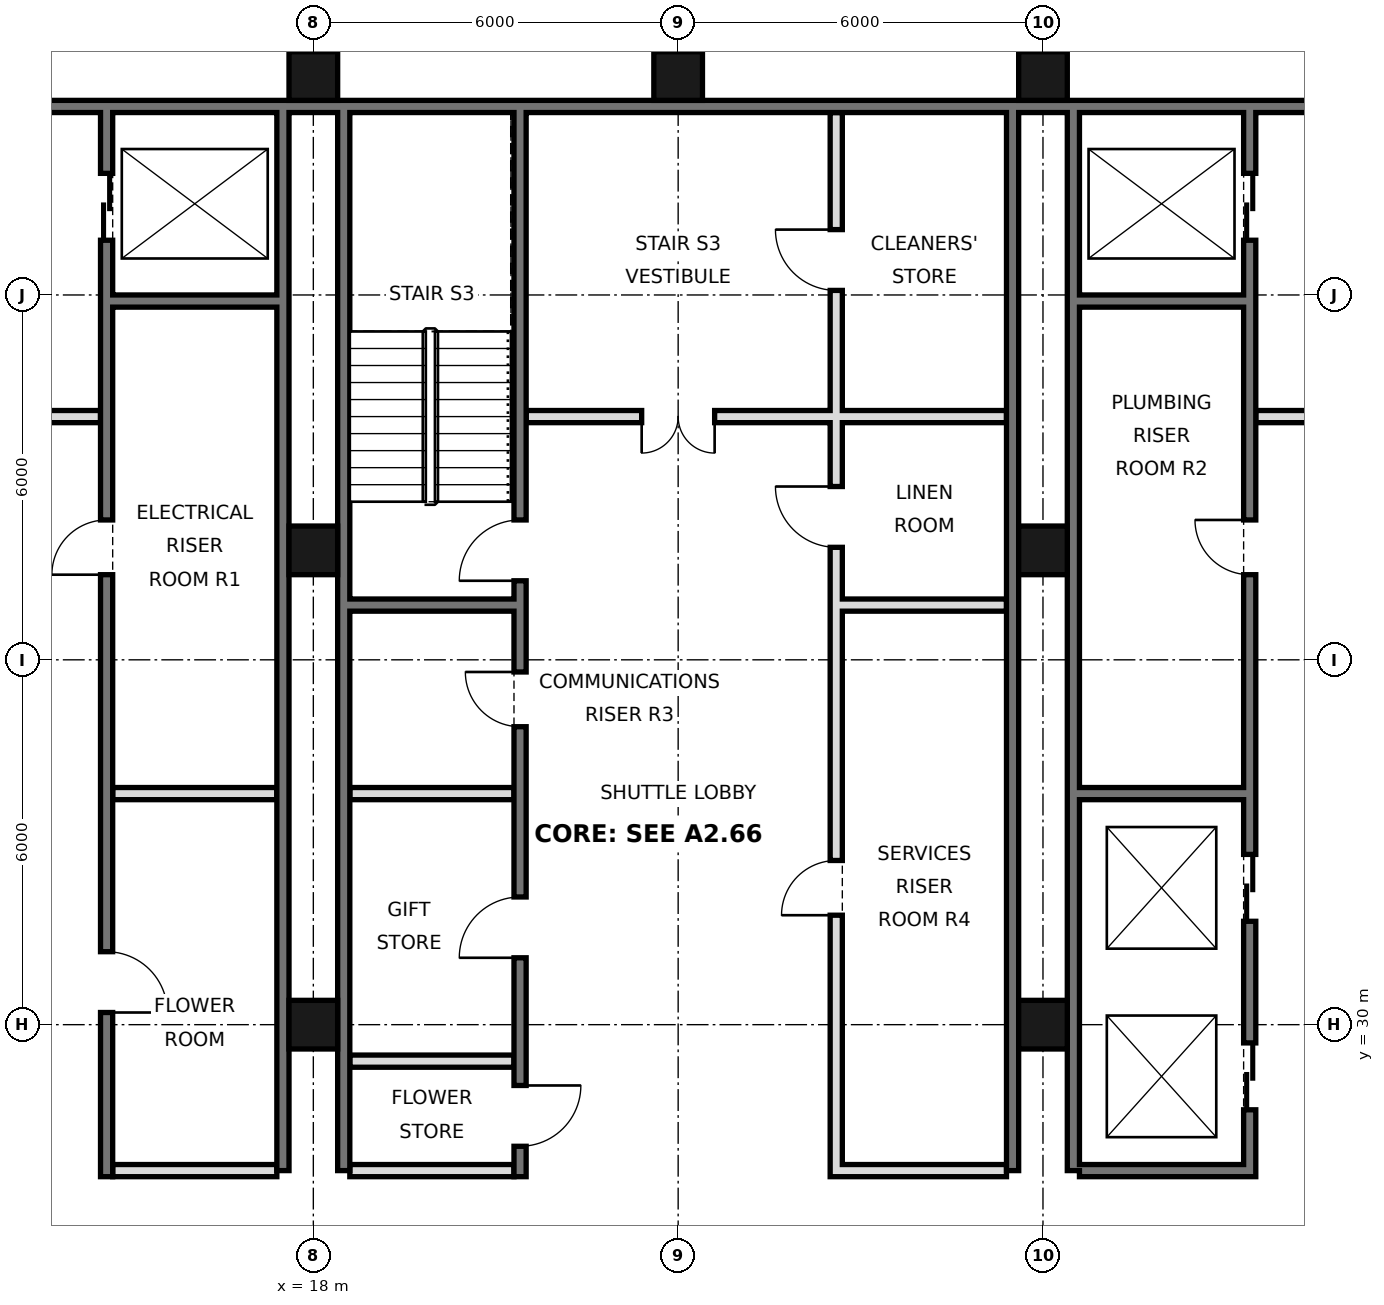
"""IFC4 building model, lengths in metres.
Left out: names, types, materials, properties, quantities, classifications, styles, units other than length and angle.
Written with IfcOpenShell. Run it as: python <this file> out.ifc"""

import sys

from ifc_helpers import new_model, si_unit, direction, frame, frame_2d, origin, origin_2d, place, context, subcontext, project, spatial, rectangle, hollow_rectangle, extrude, element, fill, save


model = new_model("IFC4")
c1 = context("Model", 3, precision=1e-05, world=origin(), true_north=direction((0.0, 1.0)))
c2 = subcontext(c1, "Body", "Model", "MODEL_VIEW")
j1 = project(units=[si_unit("LENGTHUNIT", "METRE"), si_unit("PLANEANGLEUNIT", "RADIAN")], contexts=[c1])
p1 = place(None, origin())
s1 = spatial("IfcSite", under=j1, at=p1, CompositionType="ELEMENT")
p2 = place(p1, origin())
s2 = spatial("IfcBuilding", under=s1, at=p2, CompositionType="ELEMENT")
p3 = place(p2, frame((0.0, 0.0, 263.0)))
s3 = spatial("IfcBuildingStorey", under=s2, at=p3, CompositionType="ELEMENT", Elevation=263.0)
for number, where, z_axis, x_axis in (
    (1, (18.0, 30.0, 0.0), (0.0, 0.0, 1.0), (1.0, 0.0, 0.0)),
    (2, (18.0, 37.8, 0.0), (0.0, 0.0, 1.0), (1.0, 0.0, 0.0)),
    (3, (18.0, 45.6, 0.0), (0.0, 0.0, 1.0), (1.0, 0.0, 0.0)),
    (4, (24.0, 45.6, 0.0), (0.0, 0.0, 1.0), (1.0, 0.0, 0.0)),
    (5, (30.0, 30.0, 0.0), (0.0, 0.0, 1.0), (1.0, 0.0, 0.0)),
    (6, (30.0, 37.8, 0.0), (0.0, 0.0, 1.0), (1.0, 0.0, 0.0)),
    (7, (30.0, 45.6, 0.0), (0.0, 0.0, 1.0), (1.0, 0.0, 0.0)),
):
    element("IfcColumn", number, at=place(p3, frame(where, z_axis=z_axis, x_axis=x_axis)), inside=s3, PredefinedType="COLUMN", context=c2, shape_type="SweptSolid", body=[
        extrude(hollow_rectangle(XDim=0.8, YDim=0.8, WallThickness=0.032, at=origin_2d()), origin(), (0.0, 0.0, 1.0), 3.6),
    ])
p4 = place(p3, frame((6.6, 45.1, 0.0), z_axis=(0.0, 0.0, 1.0), x_axis=(1.0, 0.0, 0.0)))
e8 = element("IfcWall", 8, at=p4, inside=s3, PredefinedType="SOLIDWALL", context=c2, shape_type="SweptSolid", body=[
    extrude(rectangle(XDim=34.8, YDim=0.2, at=frame_2d((17.4, 0.0))), origin(), (0.0, 0.0, 1.0), 3.42),
])
for number, where, z_axis, x_axis in (
    (9, (17.5, 27.6, 0.0), (0.0, 0.0, 1.0), (0.0, 1.0, 0.0)),
    (10, (18.5, 27.6, 0.0), (0.0, 0.0, 1.0), (0.0, 1.0, 0.0)),
    (11, (29.5, 27.6, 0.0), (0.0, 0.0, 1.0), (0.0, 1.0, 0.0)),
    (12, (30.5, 27.6, 0.0), (0.0, 0.0, 1.0), (0.0, 1.0, 0.0)),
):
    element("IfcWall", number, at=place(p3, frame(where, z_axis=z_axis, x_axis=x_axis)), inside=s3, PredefinedType="SOLIDWALL", context=c2, shape_type="SweptSolid", body=[
        extrude(rectangle(XDim=17.5, YDim=0.2, at=frame_2d((8.75, 0.0))), origin(), (0.0, 0.0, 1.0), 3.42),
    ])
p5 = place(p3, frame((14.6, 27.5, 0.0), z_axis=(0.0, 0.0, 1.0), x_axis=(0.0, 1.0, 0.0)))
e13 = element("IfcWall", 13, at=p5, inside=s3, PredefinedType="SOLIDWALL", context=c2, shape_type="SweptSolid", body=[
    extrude(rectangle(XDim=17.5, YDim=0.2, at=frame_2d((8.75, 0.0))), origin(), (0.0, 0.0, 1.0), 3.42),
])
p6 = place(p5, frame((15.4, 0.0, 0.0)))
e14 = element("IfcOpeningElement", 14, at=p6, cuts=e13, PredefinedType="OPENING", context=c2, shape_type="SweptSolid", body=[
    extrude(rectangle(XDim=1.1, YDim=2.1, at=frame_2d((0.55, 1.05))), frame((0.0, 0.11, 0.0), z_axis=(0.0, -1.0, 0.0), x_axis=(1.0, 0.0, 0.0)), (0.0, 0.0, 1.0), 0.22),
])
p7 = place(p5, frame((2.7, 0.0, 0.0)))
e15 = element("IfcOpeningElement", 15, at=p7, cuts=e13, PredefinedType="OPENING", context=c2, shape_type="SweptSolid", body=[
    extrude(rectangle(XDim=1.0, YDim=2.1, at=frame_2d((0.5, 1.05))), frame((0.0, 0.11, 0.0), z_axis=(0.0, -1.0, 0.0), x_axis=(1.0, 0.0, 0.0)), (0.0, 0.0, 1.0), 0.22),
])
p8 = place(p5, frame((9.9, 0.0, 0.0)))
e16 = element("IfcOpeningElement", 16, at=p8, cuts=e13, PredefinedType="OPENING", context=c2, shape_type="SweptSolid", body=[
    extrude(rectangle(XDim=0.9, YDim=2.1, at=frame_2d((0.45, 1.05))), frame((0.0, 0.11, 0.0), z_axis=(0.0, -1.0, 0.0), x_axis=(1.0, 0.0, 0.0)), (0.0, 0.0, 1.0), 0.22),
])
p9 = place(p3, frame((21.4, 27.5, 0.0), z_axis=(0.0, 0.0, 1.0), x_axis=(0.0, 1.0, 0.0)))
e17 = element("IfcWall", 17, at=p9, inside=s3, PredefinedType="SOLIDWALL", context=c2, shape_type="SweptSolid", body=[
    extrude(rectangle(XDim=17.5, YDim=0.2, at=frame_2d((8.75, 0.0))), origin(), (0.0, 0.0, 1.0), 3.42),
])
p10 = place(p9, frame((0.5, 0.0, 0.0)))
e18 = element("IfcOpeningElement", 18, at=p10, cuts=e17, PredefinedType="OPENING", context=c2, shape_type="SweptSolid", body=[
    extrude(rectangle(XDim=1.0, YDim=2.1, at=frame_2d((0.5, 1.05))), frame((0.0, 0.11, 0.0), z_axis=(0.0, -1.0, 0.0), x_axis=(1.0, 0.0, 0.0)), (0.0, 0.0, 1.0), 0.22),
])
p11 = place(p9, frame((3.6, 0.0, 0.0)))
e19 = element("IfcOpeningElement", 19, at=p11, cuts=e17, PredefinedType="OPENING", context=c2, shape_type="SweptSolid", body=[
    extrude(rectangle(XDim=1.0, YDim=2.1, at=frame_2d((0.5, 1.05))), frame((0.0, 0.11, 0.0), z_axis=(0.0, -1.0, 0.0), x_axis=(1.0, 0.0, 0.0)), (0.0, 0.0, 1.0), 0.22),
])
p12 = place(p9, frame((9.8, 0.0, 0.0)))
e20 = element("IfcOpeningElement", 20, at=p12, cuts=e17, PredefinedType="OPENING", context=c2, shape_type="SweptSolid", body=[
    extrude(rectangle(XDim=1.0, YDim=2.1, at=frame_2d((0.5, 1.05))), frame((0.0, 0.11, 0.0), z_axis=(0.0, -1.0, 0.0), x_axis=(1.0, 0.0, 0.0)), (0.0, 0.0, 1.0), 0.22),
])
p13 = place(p9, frame((7.4, 0.0, 0.0)))
e21 = element("IfcOpeningElement", 21, at=p13, cuts=e17, PredefinedType="OPENING", context=c2, shape_type="SweptSolid", body=[
    extrude(rectangle(XDim=0.9, YDim=2.1, at=frame_2d((0.45, 1.05))), frame((0.0, 0.11, 0.0), z_axis=(0.0, -1.0, 0.0), x_axis=(1.0, 0.0, 0.0)), (0.0, 0.0, 1.0), 0.22),
])
p14 = place(p3, frame((26.6, 27.5, 0.0), z_axis=(0.0, 0.0, 1.0), x_axis=(0.0, 1.0, 0.0)))
e22 = element("IfcWall", 22, at=p14, inside=s3, PredefinedType="SOLIDWALL", context=c2, shape_type="SweptSolid", body=[
    extrude(rectangle(XDim=17.5, YDim=0.2, at=frame_2d((8.75, 0.0))), origin(), (0.0, 0.0, 1.0), 3.42),
])
p15 = place(p14, frame((4.3, 0.0, 0.0)))
e23 = element("IfcOpeningElement", 23, at=p15, cuts=e22, PredefinedType="OPENING", context=c2, shape_type="SweptSolid", body=[
    extrude(rectangle(XDim=0.9, YDim=2.1, at=frame_2d((0.45, 1.05))), frame((0.0, 0.11, 0.0), z_axis=(0.0, -1.0, 0.0), x_axis=(1.0, 0.0, 0.0)), (0.0, 0.0, 1.0), 0.22),
])
p16 = place(p14, frame((10.35, 0.0, 0.0)))
e24 = element("IfcOpeningElement", 24, at=p16, cuts=e22, PredefinedType="OPENING", context=c2, shape_type="SweptSolid", body=[
    extrude(rectangle(XDim=1.0, YDim=2.1, at=frame_2d((0.5, 1.05))), frame((0.0, 0.11, 0.0), z_axis=(0.0, -1.0, 0.0), x_axis=(1.0, 0.0, 0.0)), (0.0, 0.0, 1.0), 0.22),
])
p17 = place(p14, frame((14.575, 0.0, 0.0)))
e25 = element("IfcOpeningElement", 25, at=p17, cuts=e22, PredefinedType="OPENING", context=c2, shape_type="SweptSolid", body=[
    extrude(rectangle(XDim=1.0, YDim=2.1, at=frame_2d((0.5, 1.05))), frame((0.0, 0.11, 0.0), z_axis=(0.0, -1.0, 0.0), x_axis=(1.0, 0.0, 0.0)), (0.0, 0.0, 1.0), 0.22),
])
p18 = place(p3, frame((33.4, 27.5, 0.0), z_axis=(0.0, 0.0, 1.0), x_axis=(0.0, 1.0, 0.0)))
e26 = element("IfcWall", 26, at=p18, inside=s3, PredefinedType="SOLIDWALL", context=c2, shape_type="SweptSolid", body=[
    extrude(rectangle(XDim=17.5, YDim=0.2, at=frame_2d((8.75, 0.0))), origin(), (0.0, 0.0, 1.0), 3.42),
])
p19 = place(p18, frame((1.1, 0.0, 0.0)))
e27 = element("IfcOpeningElement", 27, at=p19, cuts=e26, PredefinedType="OPENING", context=c2, shape_type="SweptSolid", body=[
    extrude(rectangle(XDim=1.1, YDim=2.1, at=frame_2d((0.55, 1.05))), frame((0.0, 0.11, 0.0), z_axis=(0.0, -1.0, 0.0), x_axis=(1.0, 0.0, 0.0)), (0.0, 0.0, 1.0), 0.22),
])
p20 = place(p18, frame((4.2, 0.0, 0.0)))
e28 = element("IfcOpeningElement", 28, at=p20, cuts=e26, PredefinedType="OPENING", context=c2, shape_type="SweptSolid", body=[
    extrude(rectangle(XDim=1.1, YDim=2.1, at=frame_2d((0.55, 1.05))), frame((0.0, 0.11, 0.0), z_axis=(0.0, -1.0, 0.0), x_axis=(1.0, 0.0, 0.0)), (0.0, 0.0, 1.0), 0.22),
])
p21 = place(p18, frame((15.4, 0.0, 0.0)))
e29 = element("IfcOpeningElement", 29, at=p21, cuts=e26, PredefinedType="OPENING", context=c2, shape_type="SweptSolid", body=[
    extrude(rectangle(XDim=1.1, YDim=2.1, at=frame_2d((0.55, 1.05))), frame((0.0, 0.11, 0.0), z_axis=(0.0, -1.0, 0.0), x_axis=(1.0, 0.0, 0.0)), (0.0, 0.0, 1.0), 0.22),
])
p22 = place(p18, frame((9.9, 0.0, 0.0)))
e30 = element("IfcOpeningElement", 30, at=p22, cuts=e26, PredefinedType="OPENING", context=c2, shape_type="SweptSolid", body=[
    extrude(rectangle(XDim=0.9, YDim=2.1, at=frame_2d((0.45, 1.05))), frame((0.0, 0.11, 0.0), z_axis=(0.0, -1.0, 0.0), x_axis=(1.0, 0.0, 0.0)), (0.0, 0.0, 1.0), 0.22),
])
for number, where, z_axis, x_axis in (
    (31, (14.7, 27.6, 0.0), (0.0, 0.0, 1.0), (1.0, 0.0, 0.0)),
    (32, (18.6, 27.6, 0.0), (0.0, 0.0, 1.0), (1.0, 0.0, 0.0)),
):
    element("IfcWall", number, at=place(p3, frame(where, z_axis=z_axis, x_axis=x_axis)), inside=s3, PredefinedType="PARTITIONING", context=c2, shape_type="SweptSolid", body=[
        extrude(rectangle(XDim=2.7, YDim=0.2, at=frame_2d((1.35, 0.0))), origin(), (0.0, 0.0, 1.0), 3.42),
    ])
for number, where, z_axis, x_axis in (
    (33, (26.7, 27.6, 0.0), (0.0, 0.0, 1.0), (1.0, 0.0, 0.0)),
    (34, (30.6, 27.6, 0.0), (0.0, 0.0, 1.0), (1.0, 0.0, 0.0)),
):
    element("IfcWall", number, at=place(p3, frame(where, z_axis=z_axis, x_axis=x_axis)), inside=s3, PredefinedType="SOLIDWALL", context=c2, shape_type="SweptSolid", body=[
        extrude(rectangle(XDim=2.7, YDim=0.2, at=frame_2d((1.35, 0.0))), origin(), (0.0, 0.0, 1.0), 3.42),
    ])
p23 = place(p3, frame((18.6, 29.4, 0.0), z_axis=(0.0, 0.0, 1.0), x_axis=(1.0, 0.0, 0.0)))
e35 = element("IfcWall", 35, at=p23, inside=s3, PredefinedType="PARTITIONING", context=c2, shape_type="SweptSolid", body=[
    extrude(rectangle(XDim=2.7, YDim=0.2, at=frame_2d((1.35, 0.0))), origin(), (0.0, 0.0, 1.0), 3.42),
])
for number, where, z_axis, x_axis in (
    (36, (14.7, 33.8, 0.0), (0.0, 0.0, 1.0), (1.0, 0.0, 0.0)),
    (37, (18.6, 33.8, 0.0), (0.0, 0.0, 1.0), (1.0, 0.0, 0.0)),
    (38, (30.6, 33.8, 0.0), (0.0, 0.0, 1.0), (1.0, 0.0, 0.0)),
    (39, (18.6, 36.9, 0.0), (0.0, 0.0, 1.0), (1.0, 0.0, 0.0)),
    (40, (26.7, 36.9, 0.0), (0.0, 0.0, 1.0), (1.0, 0.0, 0.0)),
):
    element("IfcWall", number, at=place(p3, frame(where, z_axis=z_axis, x_axis=x_axis)), inside=s3, PredefinedType="SOLIDWALL", context=c2, shape_type="SweptSolid", body=[
        extrude(rectangle(XDim=2.7, YDim=0.2, at=frame_2d((1.35, 0.0))), origin(), (0.0, 0.0, 1.0), 3.42),
    ])
p24 = place(p3, frame((21.5, 40.0, 0.0), z_axis=(0.0, 0.0, 1.0), x_axis=(1.0, 0.0, 0.0)))
e41 = element("IfcWall", 41, at=p24, inside=s3, PredefinedType="PARTITIONING", context=c2, shape_type="SweptSolid", body=[
    extrude(rectangle(XDim=7.9, YDim=0.2, at=frame_2d((3.95, 0.0))), origin(), (0.0, 0.0, 1.0), 3.42),
])
p25 = place(p24, frame((1.9, 0.0, 0.0)))
e42 = element("IfcOpeningElement", 42, at=p25, cuts=e41, PredefinedType="OPENING", context=c2, shape_type="SweptSolid", body=[
    extrude(rectangle(XDim=1.2, YDim=2.1, at=frame_2d((0.6, 1.05))), frame((0.0, 0.11, 0.0), z_axis=(0.0, -1.0, 0.0), x_axis=(1.0, 0.0, 0.0)), (0.0, 0.0, 1.0), 0.22),
])
p26 = place(p3, frame((33.5, 40.0, 0.0), z_axis=(0.0, 0.0, 1.0), x_axis=(1.0, 0.0, 0.0)))
e43 = element("IfcWall", 43, at=p26, inside=s3, PredefinedType="PARTITIONING", context=c2, shape_type="SweptSolid", body=[
    extrude(rectangle(XDim=5.0, YDim=0.2, at=frame_2d((2.5, 0.0))), origin(), (0.0, 0.0, 1.0), 3.42),
])
p27 = place(p26, frame((1.9, 0.0, 0.0)))
e44 = element("IfcOpeningElement", 44, at=p27, cuts=e43, PredefinedType="OPENING", context=c2, shape_type="SweptSolid", body=[
    extrude(rectangle(XDim=1.2, YDim=2.1, at=frame_2d((0.6, 1.05))), frame((0.0, 0.11, 0.0), z_axis=(0.0, -1.0, 0.0), x_axis=(1.0, 0.0, 0.0)), (0.0, 0.0, 1.0), 0.22),
])
p28 = place(p3, frame((9.5, 40.0, 0.0), z_axis=(0.0, 0.0, 1.0), x_axis=(1.0, 0.0, 0.0)))
e45 = element("IfcWall", 45, at=p28, inside=s3, PredefinedType="PARTITIONING", context=c2, shape_type="SweptSolid", body=[
    extrude(rectangle(XDim=5.0, YDim=0.2, at=frame_2d((2.5, 0.0))), origin(), (0.0, 0.0, 1.0), 3.42),
])
p29 = place(p28, frame((1.9, 0.0, 0.0)))
e46 = element("IfcOpeningElement", 46, at=p29, cuts=e45, PredefinedType="OPENING", context=c2, shape_type="SweptSolid", body=[
    extrude(rectangle(XDim=1.2, YDim=2.1, at=frame_2d((0.6, 1.05))), frame((0.0, 0.11, 0.0), z_axis=(0.0, -1.0, 0.0), x_axis=(1.0, 0.0, 0.0)), (0.0, 0.0, 1.0), 0.22),
])
for number, where, z_axis, x_axis in (
    (47, (14.7, 41.9, 0.0), (0.0, 0.0, 1.0), (1.0, 0.0, 0.0)),
    (48, (30.6, 41.9, 0.0), (0.0, 0.0, 1.0), (1.0, 0.0, 0.0)),
):
    element("IfcWall", number, at=place(p3, frame(where, z_axis=z_axis, x_axis=x_axis)), inside=s3, PredefinedType="SOLIDWALL", context=c2, shape_type="SweptSolid", body=[
        extrude(rectangle(XDim=2.7, YDim=0.2, at=frame_2d((1.35, 0.0))), origin(), (0.0, 0.0, 1.0), 3.42),
    ])
p30 = place(p25, frame((1.2, 0.0, 0.0), z_axis=(0.0, 0.0, 1.0), x_axis=(-1.0, 0.0, 0.0)))
e49 = element("IfcDoor", 49, at=p30, inside=s3, OperationType="DOUBLE_DOOR_SINGLE_SWING", PredefinedType="DOOR", context=c2, shape_type="SweptSolid", body=[
    extrude(rectangle(XDim=1.2, YDim=2.1, at=frame_2d((0.6, 1.05))), frame((0.0, 0.025, 0.0), z_axis=(0.0, -1.0, 0.0), x_axis=(1.0, 0.0, 0.0)), (0.0, 0.0, 1.0), 0.05),
])
fill(e42, e49)
p31 = place(p19, origin())
e50 = element("IfcDoor", 50, at=p31, inside=s3, OperationType="DOUBLE_DOOR_SLIDING", PredefinedType="DOOR", context=c2, shape_type="SweptSolid", body=[
    extrude(rectangle(XDim=1.1, YDim=2.1, at=frame_2d((0.55, 1.05))), frame((0.0, 0.025, 0.0), z_axis=(0.0, -1.0, 0.0), x_axis=(1.0, 0.0, 0.0)), (0.0, 0.0, 1.0), 0.05),
])
fill(e27, e50)
p32 = place(p20, origin())
e51 = element("IfcDoor", 51, at=p32, inside=s3, OperationType="DOUBLE_DOOR_SLIDING", PredefinedType="DOOR", context=c2, shape_type="SweptSolid", body=[
    extrude(rectangle(XDim=1.1, YDim=2.1, at=frame_2d((0.55, 1.05))), frame((0.0, 0.025, 0.0), z_axis=(0.0, -1.0, 0.0), x_axis=(1.0, 0.0, 0.0)), (0.0, 0.0, 1.0), 0.05),
])
fill(e28, e51)
p33 = place(p21, origin())
e52 = element("IfcDoor", 52, at=p33, inside=s3, OperationType="DOUBLE_DOOR_SLIDING", PredefinedType="DOOR", context=c2, shape_type="SweptSolid", body=[
    extrude(rectangle(XDim=1.1, YDim=2.1, at=frame_2d((0.55, 1.05))), frame((0.0, 0.025, 0.0), z_axis=(0.0, -1.0, 0.0), x_axis=(1.0, 0.0, 0.0)), (0.0, 0.0, 1.0), 0.05),
])
fill(e29, e52)
p34 = place(p6, origin())
e53 = element("IfcDoor", 53, at=p34, inside=s3, OperationType="DOUBLE_DOOR_SLIDING", PredefinedType="DOOR", context=c2, shape_type="SweptSolid", body=[
    extrude(rectangle(XDim=1.1, YDim=2.1, at=frame_2d((0.55, 1.05))), frame((0.0, 0.025, 0.0), z_axis=(0.0, -1.0, 0.0), x_axis=(1.0, 0.0, 0.0)), (0.0, 0.0, 1.0), 0.05),
])
fill(e14, e53)
p35 = place(p10, origin())
e54 = element("IfcDoor", 54, at=p35, inside=s3, OperationType="SINGLE_SWING_RIGHT", PredefinedType="DOOR", context=c2, shape_type="SweptSolid", body=[
    extrude(rectangle(XDim=1.0, YDim=2.1, at=frame_2d((0.5, 1.05))), frame((0.0, 0.025, 0.0), z_axis=(0.0, -1.0, 0.0), x_axis=(1.0, 0.0, 0.0)), (0.0, 0.0, 1.0), 0.05),
])
fill(e18, e54)
p36 = place(p11, origin())
e55 = element("IfcDoor", 55, at=p36, inside=s3, OperationType="SINGLE_SWING_LEFT", PredefinedType="DOOR", context=c2, shape_type="SweptSolid", body=[
    extrude(rectangle(XDim=1.0, YDim=2.1, at=frame_2d((0.5, 1.05))), frame((0.0, 0.025, 0.0), z_axis=(0.0, -1.0, 0.0), x_axis=(1.0, 0.0, 0.0)), (0.0, 0.0, 1.0), 0.05),
])
fill(e19, e55)
p37 = place(p7, frame((1.0, 0.0, 0.0), z_axis=(0.0, 0.0, 1.0), x_axis=(-1.0, 0.0, 0.0)))
e56 = element("IfcDoor", 56, at=p37, inside=s3, OperationType="SINGLE_SWING_RIGHT", PredefinedType="DOOR", context=c2, shape_type="SweptSolid", body=[
    extrude(rectangle(XDim=1.0, YDim=2.1, at=frame_2d((0.5, 1.05))), frame((0.0, 0.025, 0.0), z_axis=(0.0, -1.0, 0.0), x_axis=(1.0, 0.0, 0.0)), (0.0, 0.0, 1.0), 0.05),
])
fill(e15, e56)
p38 = place(p12, origin())
e57 = element("IfcDoor", 57, at=p38, inside=s3, OperationType="SINGLE_SWING_LEFT", PredefinedType="DOOR", context=c2, shape_type="SweptSolid", body=[
    extrude(rectangle(XDim=1.0, YDim=2.1, at=frame_2d((0.5, 1.05))), frame((0.0, 0.025, 0.0), z_axis=(0.0, -1.0, 0.0), x_axis=(1.0, 0.0, 0.0)), (0.0, 0.0, 1.0), 0.05),
])
fill(e20, e57)
p39 = place(p8, origin())
e58 = element("IfcDoor", 58, at=p39, inside=s3, OperationType="SINGLE_SWING_LEFT", PredefinedType="DOOR", context=c2, shape_type="SweptSolid", body=[
    extrude(rectangle(XDim=0.9, YDim=2.1, at=frame_2d((0.45, 1.05))), frame((0.0, 0.025, 0.0), z_axis=(0.0, -1.0, 0.0), x_axis=(1.0, 0.0, 0.0)), (0.0, 0.0, 1.0), 0.05),
])
fill(e16, e58)
p40 = place(p22, frame((0.9, 0.0, 0.0), z_axis=(0.0, 0.0, 1.0), x_axis=(-1.0, 0.0, 0.0)))
e59 = element("IfcDoor", 59, at=p40, inside=s3, OperationType="SINGLE_SWING_LEFT", PredefinedType="DOOR", context=c2, shape_type="SweptSolid", body=[
    extrude(rectangle(XDim=0.9, YDim=2.1, at=frame_2d((0.45, 1.05))), frame((0.0, 0.025, 0.0), z_axis=(0.0, -1.0, 0.0), x_axis=(1.0, 0.0, 0.0)), (0.0, 0.0, 1.0), 0.05),
])
fill(e30, e59)
p41 = place(p13, frame((0.9, 0.0, 0.0), z_axis=(0.0, 0.0, 1.0), x_axis=(-1.0, 0.0, 0.0)))
e60 = element("IfcDoor", 60, at=p41, inside=s3, OperationType="SINGLE_SWING_LEFT", PredefinedType="DOOR", context=c2, shape_type="SweptSolid", body=[
    extrude(rectangle(XDim=0.9, YDim=2.1, at=frame_2d((0.45, 1.05))), frame((0.0, 0.025, 0.0), z_axis=(0.0, -1.0, 0.0), x_axis=(1.0, 0.0, 0.0)), (0.0, 0.0, 1.0), 0.05),
])
fill(e21, e60)
p42 = place(p15, origin())
e61 = element("IfcDoor", 61, at=p42, inside=s3, OperationType="SINGLE_SWING_LEFT", PredefinedType="DOOR", context=c2, shape_type="SweptSolid", body=[
    extrude(rectangle(XDim=0.9, YDim=2.1, at=frame_2d((0.45, 1.05))), frame((0.0, 0.025, 0.0), z_axis=(0.0, -1.0, 0.0), x_axis=(1.0, 0.0, 0.0)), (0.0, 0.0, 1.0), 0.05),
])
fill(e23, e61)
p43 = place(p16, frame((1.0, 0.0, 0.0), z_axis=(0.0, 0.0, 1.0), x_axis=(-1.0, 0.0, 0.0)))
e62 = element("IfcDoor", 62, at=p43, inside=s3, OperationType="SINGLE_SWING_LEFT", PredefinedType="DOOR", context=c2, shape_type="SweptSolid", body=[
    extrude(rectangle(XDim=1.0, YDim=2.1, at=frame_2d((0.5, 1.05))), frame((0.0, 0.025, 0.0), z_axis=(0.0, -1.0, 0.0), x_axis=(1.0, 0.0, 0.0)), (0.0, 0.0, 1.0), 0.05),
])
fill(e24, e62)
p44 = place(p17, frame((1.0, 0.0, 0.0), z_axis=(0.0, 0.0, 1.0), x_axis=(-1.0, 0.0, 0.0)))
e63 = element("IfcDoor", 63, at=p44, inside=s3, OperationType="SINGLE_SWING_LEFT", PredefinedType="DOOR", context=c2, shape_type="SweptSolid", body=[
    extrude(rectangle(XDim=1.0, YDim=2.1, at=frame_2d((0.5, 1.05))), frame((0.0, 0.025, 0.0), z_axis=(0.0, -1.0, 0.0), x_axis=(1.0, 0.0, 0.0)), (0.0, 0.0, 1.0), 0.05),
])
fill(e25, e63)
save(model, sys.argv[1])
